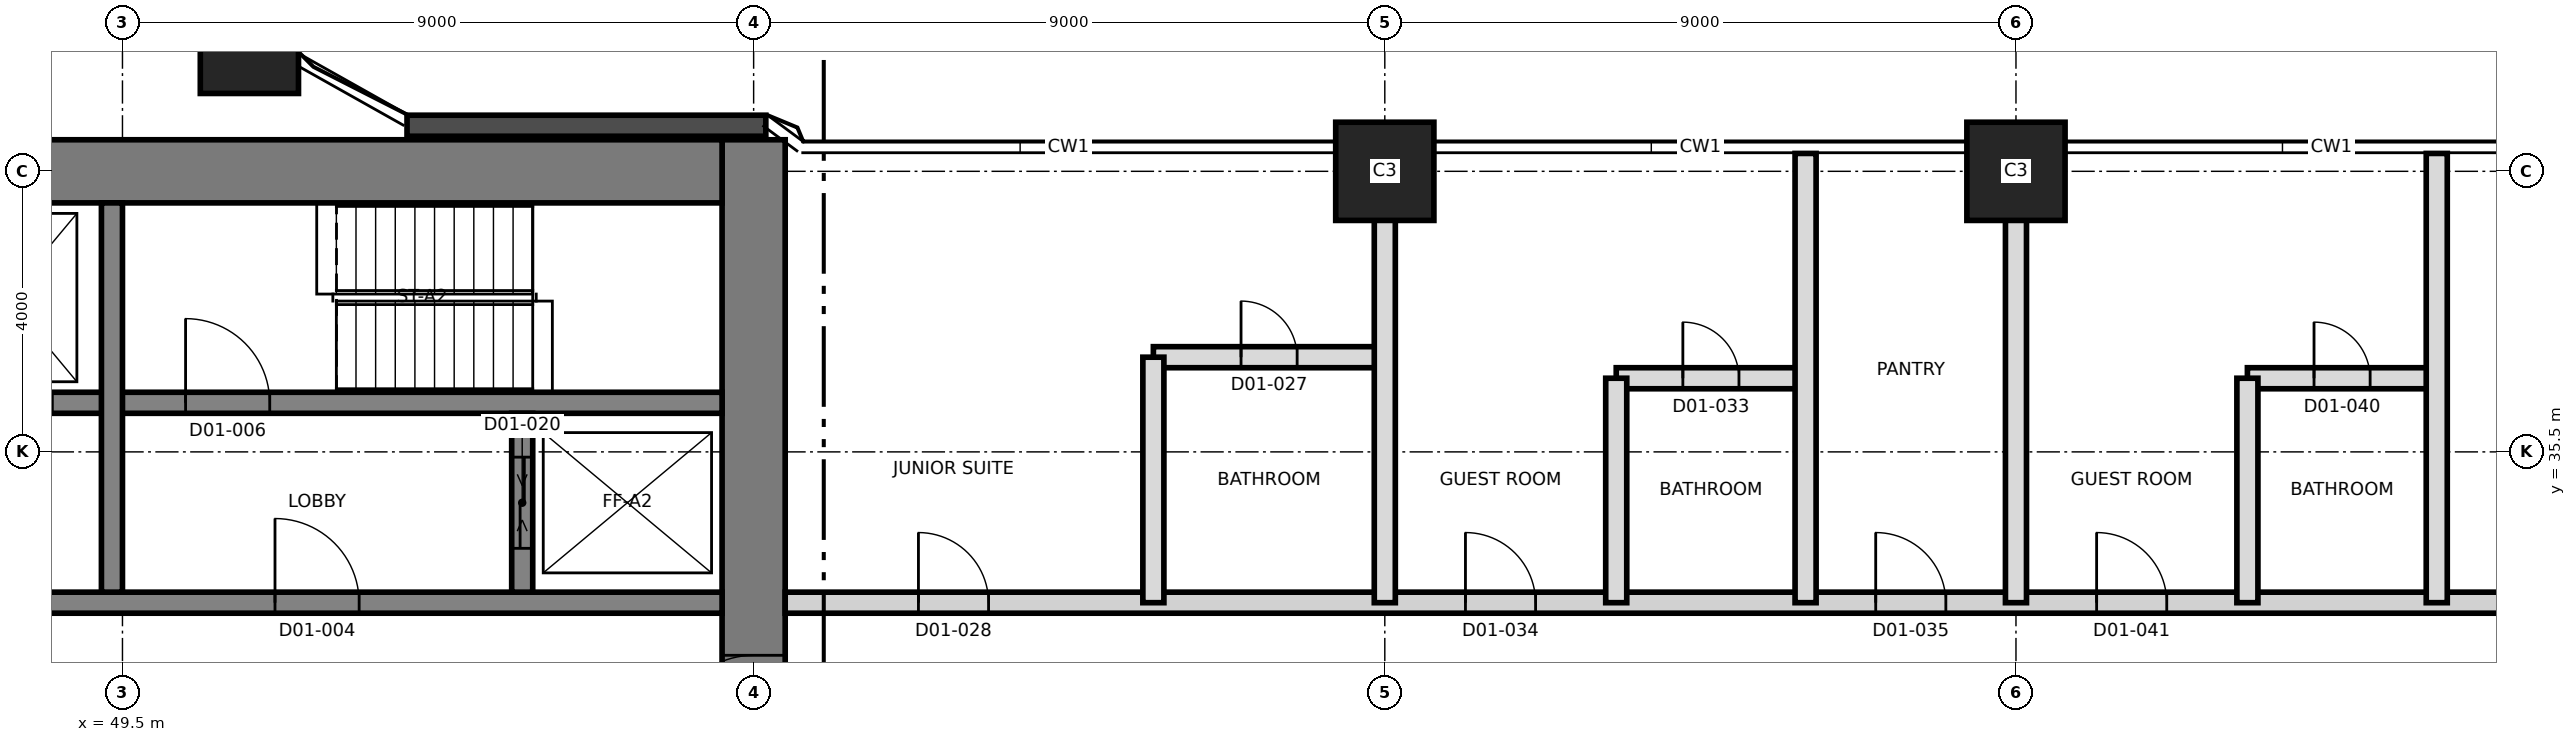
"""IFC4 building model, lengths in metres.
Left out: names, types, materials, properties, quantities, classifications, styles, units other than length and angle.
Written with IfcOpenShell. Run it as: python <this file> out.ifc"""

import sys

from ifc_helpers import new_model, si_unit, direction, frame, frame_2d, origin, origin_2d, place, context, subcontext, project, spatial, rectangle, extrude, element, fill, save


model = new_model("IFC4")
c1 = context("Model", 3, precision=1e-05, world=origin(), true_north=direction((0.0, 1.0)))
c2 = subcontext(c1, "Body", "Model", "MODEL_VIEW")
j1 = project(units=[si_unit("LENGTHUNIT", "METRE"), si_unit("PLANEANGLEUNIT", "RADIAN")], contexts=[c1])
p1 = place(None, origin())
s1 = spatial("IfcSite", under=j1, at=p1, CompositionType="ELEMENT")
p2 = place(p1, origin())
s2 = spatial("IfcBuilding", under=s1, at=p2, CompositionType="ELEMENT")
p3 = place(p2, frame((0.0, 0.0, 40.9)))
s3 = spatial("IfcBuildingStorey", under=s2, at=p3, CompositionType="ELEMENT", Elevation=40.9)
p4 = place(p3, frame((58.5, 21.05, 0.0), z_axis=(0.0, 0.0, 1.0), x_axis=(0.0, 1.0, 0.0)))
e1 = element("IfcWall", 1, at=p4, inside=s3, PredefinedType="SHEAR", context=c2, shape_type="SweptSolid", body=[
    extrude(rectangle(XDim=18.9, YDim=0.9, at=frame_2d((9.45, 0.0))), origin(), (0.0, 0.0, 1.0), 3.7),
])
p5 = place(p4, frame((10.35, 0.0, 0.0)))
e2 = element("IfcOpeningElement", 2, at=p5, cuts=e1, PredefinedType="OPENING", context=c2, shape_type="SweptSolid", body=[
    extrude(rectangle(XDim=1.2, YDim=2.1, at=frame_2d((0.6, 1.05))), frame((0.0, 0.46, 0.0), z_axis=(0.0, -1.0, 0.0), x_axis=(1.0, 0.0, 0.0)), (0.0, 0.0, 1.0), 0.92),
])
p6 = place(p3, frame((31.05, 39.5, 0.0), z_axis=(0.0, 0.0, 1.0), x_axis=(1.0, 0.0, 0.0)))
e3 = element("IfcWall", 3, at=p6, inside=s3, PredefinedType="SHEAR", context=c2, shape_type="SweptSolid", body=[
    extrude(rectangle(XDim=27.0, YDim=0.9, at=frame_2d((13.5, 0.0))), origin(), (0.0, 0.0, 1.0), 3.7),
])
p7 = place(p6, frame((10.65, 0.0, 0.0)))
e4 = element("IfcOpeningElement", 4, at=p7, cuts=e3, PredefinedType="OPENING", context=c2, shape_type="SweptSolid", body=[
    extrude(rectangle(XDim=1.2, YDim=2.1, at=frame_2d((0.6, 1.05))), frame((0.0, 0.46, 0.0), z_axis=(0.0, -1.0, 0.0), x_axis=(1.0, 0.0, 0.0)), (0.0, 0.0, 1.0), 0.92),
])
p8 = place(p3, frame((31.95, 33.35, 0.0), z_axis=(0.0, 0.0, 1.0), x_axis=(1.0, 0.0, 0.0)))
e5 = element("IfcWall", 5, at=p8, inside=s3, PredefinedType="SHEAR", context=c2, shape_type="SweptSolid", body=[
    extrude(rectangle(XDim=26.1, YDim=0.3, at=frame_2d((13.05, 0.0))), origin(), (0.0, 0.0, 1.0), 3.7),
])
p9 = place(p8, frame((13.7, 0.0, 0.0)))
e6 = element("IfcOpeningElement", 6, at=p9, cuts=e5, PredefinedType="OPENING", context=c2, shape_type="SweptSolid", body=[
    extrude(rectangle(XDim=1.4, YDim=2.1, at=frame_2d((0.7, 1.05))), frame((0.0, 0.16, 0.0), z_axis=(0.0, -1.0, 0.0), x_axis=(1.0, 0.0, 0.0)), (0.0, 0.0, 1.0), 0.32),
])
p10 = place(p8, frame((5.175, 0.0, 0.0)))
e7 = element("IfcOpeningElement", 7, at=p10, cuts=e5, PredefinedType="OPENING", context=c2, shape_type="SweptSolid", body=[
    extrude(rectangle(XDim=1.2, YDim=2.1, at=frame_2d((0.6, 1.05))), frame((0.0, 0.16, 0.0), z_axis=(0.0, -1.0, 0.0), x_axis=(1.0, 0.0, 0.0)), (0.0, 0.0, 1.0), 0.32),
])
p11 = place(p8, frame((19.725, 0.0, 0.0)))
e8 = element("IfcOpeningElement", 8, at=p11, cuts=e5, PredefinedType="OPENING", context=c2, shape_type="SweptSolid", body=[
    extrude(rectangle(XDim=1.2, YDim=2.1, at=frame_2d((0.6, 1.05))), frame((0.0, 0.16, 0.0), z_axis=(0.0, -1.0, 0.0), x_axis=(1.0, 0.0, 0.0)), (0.0, 0.0, 1.0), 0.32),
])
p12 = place(p3, frame((43.5, 36.2, 0.0), z_axis=(0.0, 0.0, 1.0), x_axis=(1.0, 0.0, 0.0)))
e9 = element("IfcWall", 9, at=p12, inside=s3, PredefinedType="SHEAR", context=c2, shape_type="SweptSolid", body=[
    extrude(rectangle(XDim=14.55, YDim=0.3, at=frame_2d((7.275, 0.0))), origin(), (0.0, 0.0, 1.0), 3.7),
])
p13 = place(p12, frame((6.9, 0.0, 0.0)))
e10 = element("IfcOpeningElement", 10, at=p13, cuts=e9, PredefinedType="OPENING", context=c2, shape_type="SweptSolid", body=[
    extrude(rectangle(XDim=1.2, YDim=2.1, at=frame_2d((0.6, 1.05))), frame((0.0, 0.16, 0.0), z_axis=(0.0, -1.0, 0.0), x_axis=(1.0, 0.0, 0.0)), (0.0, 0.0, 1.0), 0.32),
])
p14 = place(p12, frame((0.7, 0.0, 0.0)))
e11 = element("IfcOpeningElement", 11, at=p14, cuts=e9, PredefinedType="OPENING", context=c2, shape_type="SweptSolid", body=[
    extrude(rectangle(XDim=1.3, YDim=2.4, at=frame_2d((0.65, 1.2))), frame((0.0, 0.16, 0.0), z_axis=(0.0, -1.0, 0.0), x_axis=(1.0, 0.0, 0.0)), (0.0, 0.0, 1.0), 0.32),
])
p15 = place(p12, frame((3.7, 0.0, 0.0)))
e12 = element("IfcOpeningElement", 12, at=p15, cuts=e9, PredefinedType="OPENING", context=c2, shape_type="SweptSolid", body=[
    extrude(rectangle(XDim=1.3, YDim=2.4, at=frame_2d((0.65, 1.2))), frame((0.0, 0.16, 0.0), z_axis=(0.0, -1.0, 0.0), x_axis=(1.0, 0.0, 0.0)), (0.0, 0.0, 1.0), 0.32),
])
p16 = place(p3, frame((49.35, 33.5, 0.0), z_axis=(0.0, 0.0, 1.0), x_axis=(0.0, 1.0, 0.0)))
e13 = element("IfcWall", 13, at=p16, inside=s3, PredefinedType="SHEAR", context=c2, shape_type="SweptSolid", body=[
    extrude(rectangle(XDim=5.55, YDim=0.3, at=frame_2d((2.775, 0.0))), origin(), (0.0, 0.0, 1.0), 3.7),
])
p17 = place(p3, frame((55.2, 33.5, 0.0), z_axis=(0.0, 0.0, 1.0), x_axis=(0.0, 1.0, 0.0)))
e14 = element("IfcWall", 14, at=p17, inside=s3, PredefinedType="SHEAR", context=c2, shape_type="SweptSolid", body=[
    extrude(rectangle(XDim=2.55, YDim=0.3, at=frame_2d((1.275, 0.0))), origin(), (0.0, 0.0, 1.0), 3.7),
])
p18 = place(p17, frame((0.625, 0.0, 0.0)))
e15 = element("IfcOpeningElement", 15, at=p18, cuts=e14, PredefinedType="OPENING", context=c2, shape_type="SweptSolid", body=[
    extrude(rectangle(XDim=1.3, YDim=2.4, at=frame_2d((0.65, 1.2))), frame((0.0, 0.16, 0.0), z_axis=(0.0, -1.0, 0.0), x_axis=(1.0, 0.0, 0.0)), (0.0, 0.0, 1.0), 0.32),
])
for number, where, z_axis, x_axis in (
    (16, (67.5, 39.5, 0.0), (0.0, 0.0, 1.0), (1.0, 0.0, 0.0)),
    (17, (76.5, 39.5, 0.0), (0.0, 0.0, 1.0), (1.0, 0.0, 0.0)),
    (18, (51.31, 41.31, 0.0), (0.0, 0.0, 1.0), (1.0, 0.0, 0.0)),
):
    element("IfcColumn", number, at=place(p3, frame(where, z_axis=z_axis, x_axis=x_axis)), inside=s3, PredefinedType="COLUMN", context=c2, shape_type="SweptSolid", body=[
        extrude(rectangle(XDim=1.4, YDim=1.4, at=origin_2d()), origin(), (0.0, 0.0, 1.0), 3.7),
    ])
p19 = place(p3, frame((58.674, 40.15, 0.0), z_axis=(0.0, 0.0, 1.0), x_axis=(-1.0, 0.0, 0.0)))
e19 = element("IfcWall", 19, at=p19, inside=s3, PredefinedType="SOLIDWALL", context=c2, shape_type="SweptSolid", body=[
    extrude(rectangle(XDim=5.116, YDim=0.3, at=frame_2d((2.558, 0.0))), origin(), (0.0, 0.0, 1.0), 3.4),
])
p20 = place(p3, frame((58.95, 33.35, 0.0), z_axis=(0.0, 0.0, 1.0), x_axis=(1.0, 0.0, 0.0)))
e20 = element("IfcWall", 20, at=p20, inside=s3, PredefinedType="PARTITIONING", context=c2, shape_type="SweptSolid", body=[
    extrude(rectangle(XDim=26.38, YDim=0.3, at=frame_2d((13.19, 0.0))), origin(), (0.0, 0.0, 1.0), 3.4),
])
p21 = place(p20, frame((1.9, 0.0, 0.0)))
e21 = element("IfcOpeningElement", 21, at=p21, cuts=e20, PredefinedType="OPENING", context=c2, shape_type="SweptSolid", body=[
    extrude(rectangle(XDim=1.0, YDim=2.4, at=frame_2d((0.5, 1.2))), frame((0.0, 0.16, 0.0), z_axis=(0.0, -1.0, 0.0), x_axis=(1.0, 0.0, 0.0)), (0.0, 0.0, 1.0), 0.32),
])
p22 = place(p20, frame((9.7, 0.0, 0.0)))
e22 = element("IfcOpeningElement", 22, at=p22, cuts=e20, PredefinedType="OPENING", context=c2, shape_type="SweptSolid", body=[
    extrude(rectangle(XDim=1.0, YDim=2.1, at=frame_2d((0.5, 1.05))), frame((0.0, 0.16, 0.0), z_axis=(0.0, -1.0, 0.0), x_axis=(1.0, 0.0, 0.0)), (0.0, 0.0, 1.0), 0.32),
])
p23 = place(p20, frame((15.55, 0.0, 0.0)))
e23 = element("IfcOpeningElement", 23, at=p23, cuts=e20, PredefinedType="OPENING", context=c2, shape_type="SweptSolid", body=[
    extrude(rectangle(XDim=1.0, YDim=2.1, at=frame_2d((0.5, 1.05))), frame((0.0, 0.16, 0.0), z_axis=(0.0, -1.0, 0.0), x_axis=(1.0, 0.0, 0.0)), (0.0, 0.0, 1.0), 0.32),
])
p24 = place(p20, frame((18.7, 0.0, 0.0)))
e24 = element("IfcOpeningElement", 24, at=p24, cuts=e20, PredefinedType="OPENING", context=c2, shape_type="SweptSolid", body=[
    extrude(rectangle(XDim=1.0, YDim=2.1, at=frame_2d((0.5, 1.05))), frame((0.0, 0.16, 0.0), z_axis=(0.0, -1.0, 0.0), x_axis=(1.0, 0.0, 0.0)), (0.0, 0.0, 1.0), 0.32),
])
p25 = place(p20, frame((24.55, 0.0, 0.0)))
e25 = element("IfcOpeningElement", 25, at=p25, cuts=e20, PredefinedType="OPENING", context=c2, shape_type="SweptSolid", body=[
    extrude(rectangle(XDim=1.0, YDim=2.1, at=frame_2d((0.5, 1.05))), frame((0.0, 0.16, 0.0), z_axis=(0.0, -1.0, 0.0), x_axis=(1.0, 0.0, 0.0)), (0.0, 0.0, 1.0), 0.32),
])
p26 = place(p3, frame((70.8, 36.55, 0.0), z_axis=(0.0, 0.0, 1.0), x_axis=(1.0, 0.0, 0.0)))
e26 = element("IfcWall", 26, at=p26, inside=s3, PredefinedType="PARTITIONING", context=c2, shape_type="SweptSolid", body=[
    extrude(rectangle(XDim=2.7, YDim=0.3, at=frame_2d((1.35, 0.0))), origin(), (0.0, 0.0, 1.0), 3.4),
])
p27 = place(p26, frame((0.95, 0.0, 0.0)))
e27 = element("IfcOpeningElement", 27, at=p27, cuts=e26, PredefinedType="OPENING", context=c2, shape_type="SweptSolid", body=[
    extrude(rectangle(XDim=0.8, YDim=2.1, at=frame_2d((0.4, 1.05))), frame((0.0, 0.16, 0.0), z_axis=(0.0, -1.0, 0.0), x_axis=(1.0, 0.0, 0.0)), (0.0, 0.0, 1.0), 0.32),
])
p28 = place(p3, frame((79.8, 36.55, 0.0), z_axis=(0.0, 0.0, 1.0), x_axis=(1.0, 0.0, 0.0)))
e28 = element("IfcWall", 28, at=p28, inside=s3, PredefinedType="PARTITIONING", context=c2, shape_type="SweptSolid", body=[
    extrude(rectangle(XDim=2.7, YDim=0.3, at=frame_2d((1.35, 0.0))), origin(), (0.0, 0.0, 1.0), 3.4),
])
p29 = place(p28, frame((0.95, 0.0, 0.0)))
e29 = element("IfcOpeningElement", 29, at=p29, cuts=e28, PredefinedType="OPENING", context=c2, shape_type="SweptSolid", body=[
    extrude(rectangle(XDim=0.8, YDim=2.1, at=frame_2d((0.4, 1.05))), frame((0.0, 0.16, 0.0), z_axis=(0.0, -1.0, 0.0), x_axis=(1.0, 0.0, 0.0)), (0.0, 0.0, 1.0), 0.32),
])
p30 = place(p3, frame((64.2, 36.85, 0.0), z_axis=(0.0, 0.0, 1.0), x_axis=(1.0, 0.0, 0.0)))
e30 = element("IfcWall", 30, at=p30, inside=s3, PredefinedType="PARTITIONING", context=c2, shape_type="SweptSolid", body=[
    extrude(rectangle(XDim=3.3, YDim=0.3, at=frame_2d((1.65, 0.0))), origin(), (0.0, 0.0, 1.0), 3.4),
])
p31 = place(p30, frame((1.25, 0.0, 0.0)))
e31 = element("IfcOpeningElement", 31, at=p31, cuts=e30, PredefinedType="OPENING", context=c2, shape_type="SweptSolid", body=[
    extrude(rectangle(XDim=0.8, YDim=2.1, at=frame_2d((0.4, 1.05))), frame((0.0, 0.16, 0.0), z_axis=(0.0, -1.0, 0.0), x_axis=(1.0, 0.0, 0.0)), (0.0, 0.0, 1.0), 0.32),
])
p32 = place(p3, frame((64.2, 33.35, 0.0), z_axis=(0.0, 0.0, 1.0), x_axis=(0.0, 1.0, 0.0)))
e32 = element("IfcWall", 32, at=p32, inside=s3, PredefinedType="PARTITIONING", context=c2, shape_type="SweptSolid", body=[
    extrude(rectangle(XDim=3.5, YDim=0.3, at=frame_2d((1.75, 0.0))), origin(), (0.0, 0.0, 1.0), 3.4),
])
p33 = place(p3, frame((67.5, 33.35, 0.0), z_axis=(0.0, 0.0, 1.0), x_axis=(0.0, 1.0, 0.0)))
e33 = element("IfcWall", 33, at=p33, inside=s3, PredefinedType="PARTITIONING", context=c2, shape_type="SweptSolid", body=[
    extrude(rectangle(XDim=6.225, YDim=0.3, at=frame_2d((3.112, 0.0))), origin(), (0.0, 0.0, 1.0), 3.4),
])
p34 = place(p3, frame((70.8, 33.35, 0.0), z_axis=(0.0, 0.0, 1.0), x_axis=(0.0, 1.0, 0.0)))
e34 = element("IfcWall", 34, at=p34, inside=s3, PredefinedType="PARTITIONING", context=c2, shape_type="SweptSolid", body=[
    extrude(rectangle(XDim=3.2, YDim=0.3, at=frame_2d((1.6, 0.0))), origin(), (0.0, 0.0, 1.0), 3.4),
])
p35 = place(p3, frame((73.5, 33.35, 0.0), z_axis=(0.0, 0.0, 1.0), x_axis=(0.0, 1.0, 0.0)))
e35 = element("IfcWall", 35, at=p35, inside=s3, PredefinedType="PARTITIONING", context=c2, shape_type="SweptSolid", body=[
    extrude(rectangle(XDim=6.405, YDim=0.3, at=frame_2d((3.202, 0.0))), origin(), (0.0, 0.0, 1.0), 3.4),
])
p36 = place(p3, frame((76.5, 33.35, 0.0), z_axis=(0.0, 0.0, 1.0), x_axis=(0.0, 1.0, 0.0)))
e36 = element("IfcWall", 36, at=p36, inside=s3, PredefinedType="PARTITIONING", context=c2, shape_type="SweptSolid", body=[
    extrude(rectangle(XDim=6.225, YDim=0.3, at=frame_2d((3.112, 0.0))), origin(), (0.0, 0.0, 1.0), 3.4),
])
p37 = place(p3, frame((79.8, 33.35, 0.0), z_axis=(0.0, 0.0, 1.0), x_axis=(0.0, 1.0, 0.0)))
e37 = element("IfcWall", 37, at=p37, inside=s3, PredefinedType="PARTITIONING", context=c2, shape_type="SweptSolid", body=[
    extrude(rectangle(XDim=3.2, YDim=0.3, at=frame_2d((1.6, 0.0))), origin(), (0.0, 0.0, 1.0), 3.4),
])
p38 = place(p3, frame((82.5, 33.35, 0.0), z_axis=(0.0, 0.0, 1.0), x_axis=(0.0, 1.0, 0.0)))
e38 = element("IfcWall", 38, at=p38, inside=s3, PredefinedType="PARTITIONING", context=c2, shape_type="SweptSolid", body=[
    extrude(rectangle(XDim=6.405, YDim=0.3, at=frame_2d((3.202, 0.0))), origin(), (0.0, 0.0, 1.0), 3.4),
])
p39 = place(p11, origin())
e39 = element("IfcDoor", 39, at=p39, inside=s3, OperationType="SINGLE_SWING_RIGHT", PredefinedType="DOOR", context=c2, shape_type="SweptSolid", body=[
    extrude(rectangle(XDim=1.2, YDim=2.1, at=frame_2d((0.6, 1.05))), frame((0.0, 0.025, 0.0), z_axis=(0.0, -1.0, 0.0), x_axis=(1.0, 0.0, 0.0)), (0.0, 0.0, 1.0), 0.05),
])
fill(e8, e39)
p40 = place(p13, origin())
e40 = element("IfcDoor", 40, at=p40, inside=s3, OperationType="SINGLE_SWING_LEFT", PredefinedType="DOOR", context=c2, shape_type="SweptSolid", body=[
    extrude(rectangle(XDim=1.2, YDim=2.1, at=frame_2d((0.6, 1.05))), frame((0.0, 0.025, 0.0), z_axis=(0.0, -1.0, 0.0), x_axis=(1.0, 0.0, 0.0)), (0.0, 0.0, 1.0), 0.05),
])
fill(e10, e40)
p41 = place(p5, origin())
e41 = element("IfcDoor", 41, at=p41, inside=s3, OperationType="SINGLE_SWING_LEFT", PredefinedType="DOOR", context=c2, shape_type="SweptSolid", body=[
    extrude(rectangle(XDim=1.2, YDim=2.1, at=frame_2d((0.6, 1.05))), frame((0.0, 0.025, 0.0), z_axis=(0.0, -1.0, 0.0), x_axis=(1.0, 0.0, 0.0)), (0.0, 0.0, 1.0), 0.05),
])
fill(e2, e41)
p42 = place(p18, origin())
e42 = element("IfcDoor", 42, at=p42, inside=s3, OperationType="SLIDING_TO_LEFT", PredefinedType="DOOR", context=c2, shape_type="SweptSolid", body=[
    extrude(rectangle(XDim=1.3, YDim=2.4, at=frame_2d((0.65, 1.2))), frame((0.0, 0.025, 0.0), z_axis=(0.0, -1.0, 0.0), x_axis=(1.0, 0.0, 0.0)), (0.0, 0.0, 1.0), 0.05),
])
fill(e15, e42)
p43 = place(p31, origin())
e43 = element("IfcDoor", 43, at=p43, inside=s3, OperationType="SINGLE_SWING_LEFT", PredefinedType="DOOR", context=c2, shape_type="SweptSolid", body=[
    extrude(rectangle(XDim=0.8, YDim=2.1, at=frame_2d((0.4, 1.05))), frame((0.0, 0.025, 0.0), z_axis=(0.0, -1.0, 0.0), x_axis=(1.0, 0.0, 0.0)), (0.0, 0.0, 1.0), 0.05),
])
fill(e31, e43)
p44 = place(p21, origin())
e44 = element("IfcDoor", 44, at=p44, inside=s3, OperationType="SINGLE_SWING_LEFT", PredefinedType="DOOR", context=c2, shape_type="SweptSolid", body=[
    extrude(rectangle(XDim=1.0, YDim=2.4, at=frame_2d((0.5, 1.2))), frame((0.0, 0.025, 0.0), z_axis=(0.0, -1.0, 0.0), x_axis=(1.0, 0.0, 0.0)), (0.0, 0.0, 1.0), 0.05),
])
fill(e21, e44)
p45 = place(p27, origin())
e45 = element("IfcDoor", 45, at=p45, inside=s3, OperationType="SINGLE_SWING_LEFT", PredefinedType="DOOR", context=c2, shape_type="SweptSolid", body=[
    extrude(rectangle(XDim=0.8, YDim=2.1, at=frame_2d((0.4, 1.05))), frame((0.0, 0.025, 0.0), z_axis=(0.0, -1.0, 0.0), x_axis=(1.0, 0.0, 0.0)), (0.0, 0.0, 1.0), 0.05),
])
fill(e27, e45)
p46 = place(p22, origin())
e46 = element("IfcDoor", 46, at=p46, inside=s3, OperationType="SINGLE_SWING_LEFT", PredefinedType="DOOR", context=c2, shape_type="SweptSolid", body=[
    extrude(rectangle(XDim=1.0, YDim=2.1, at=frame_2d((0.5, 1.05))), frame((0.0, 0.025, 0.0), z_axis=(0.0, -1.0, 0.0), x_axis=(1.0, 0.0, 0.0)), (0.0, 0.0, 1.0), 0.05),
])
fill(e22, e46)
p47 = place(p23, origin())
e47 = element("IfcDoor", 47, at=p47, inside=s3, OperationType="SINGLE_SWING_RIGHT", PredefinedType="DOOR", context=c2, shape_type="SweptSolid", body=[
    extrude(rectangle(XDim=1.0, YDim=2.1, at=frame_2d((0.5, 1.05))), frame((0.0, 0.025, 0.0), z_axis=(0.0, -1.0, 0.0), x_axis=(1.0, 0.0, 0.0)), (0.0, 0.0, 1.0), 0.05),
])
fill(e23, e47)
p48 = place(p29, origin())
e48 = element("IfcDoor", 48, at=p48, inside=s3, OperationType="SINGLE_SWING_RIGHT", PredefinedType="DOOR", context=c2, shape_type="SweptSolid", body=[
    extrude(rectangle(XDim=0.8, YDim=2.1, at=frame_2d((0.4, 1.05))), frame((0.0, 0.025, 0.0), z_axis=(0.0, -1.0, 0.0), x_axis=(1.0, 0.0, 0.0)), (0.0, 0.0, 1.0), 0.05),
])
fill(e29, e48)
p49 = place(p24, origin())
e49 = element("IfcDoor", 49, at=p49, inside=s3, OperationType="SINGLE_SWING_LEFT", PredefinedType="DOOR", context=c2, shape_type="SweptSolid", body=[
    extrude(rectangle(XDim=1.0, YDim=2.1, at=frame_2d((0.5, 1.05))), frame((0.0, 0.025, 0.0), z_axis=(0.0, -1.0, 0.0), x_axis=(1.0, 0.0, 0.0)), (0.0, 0.0, 1.0), 0.05),
])
fill(e24, e49)
save(model, sys.argv[1])
